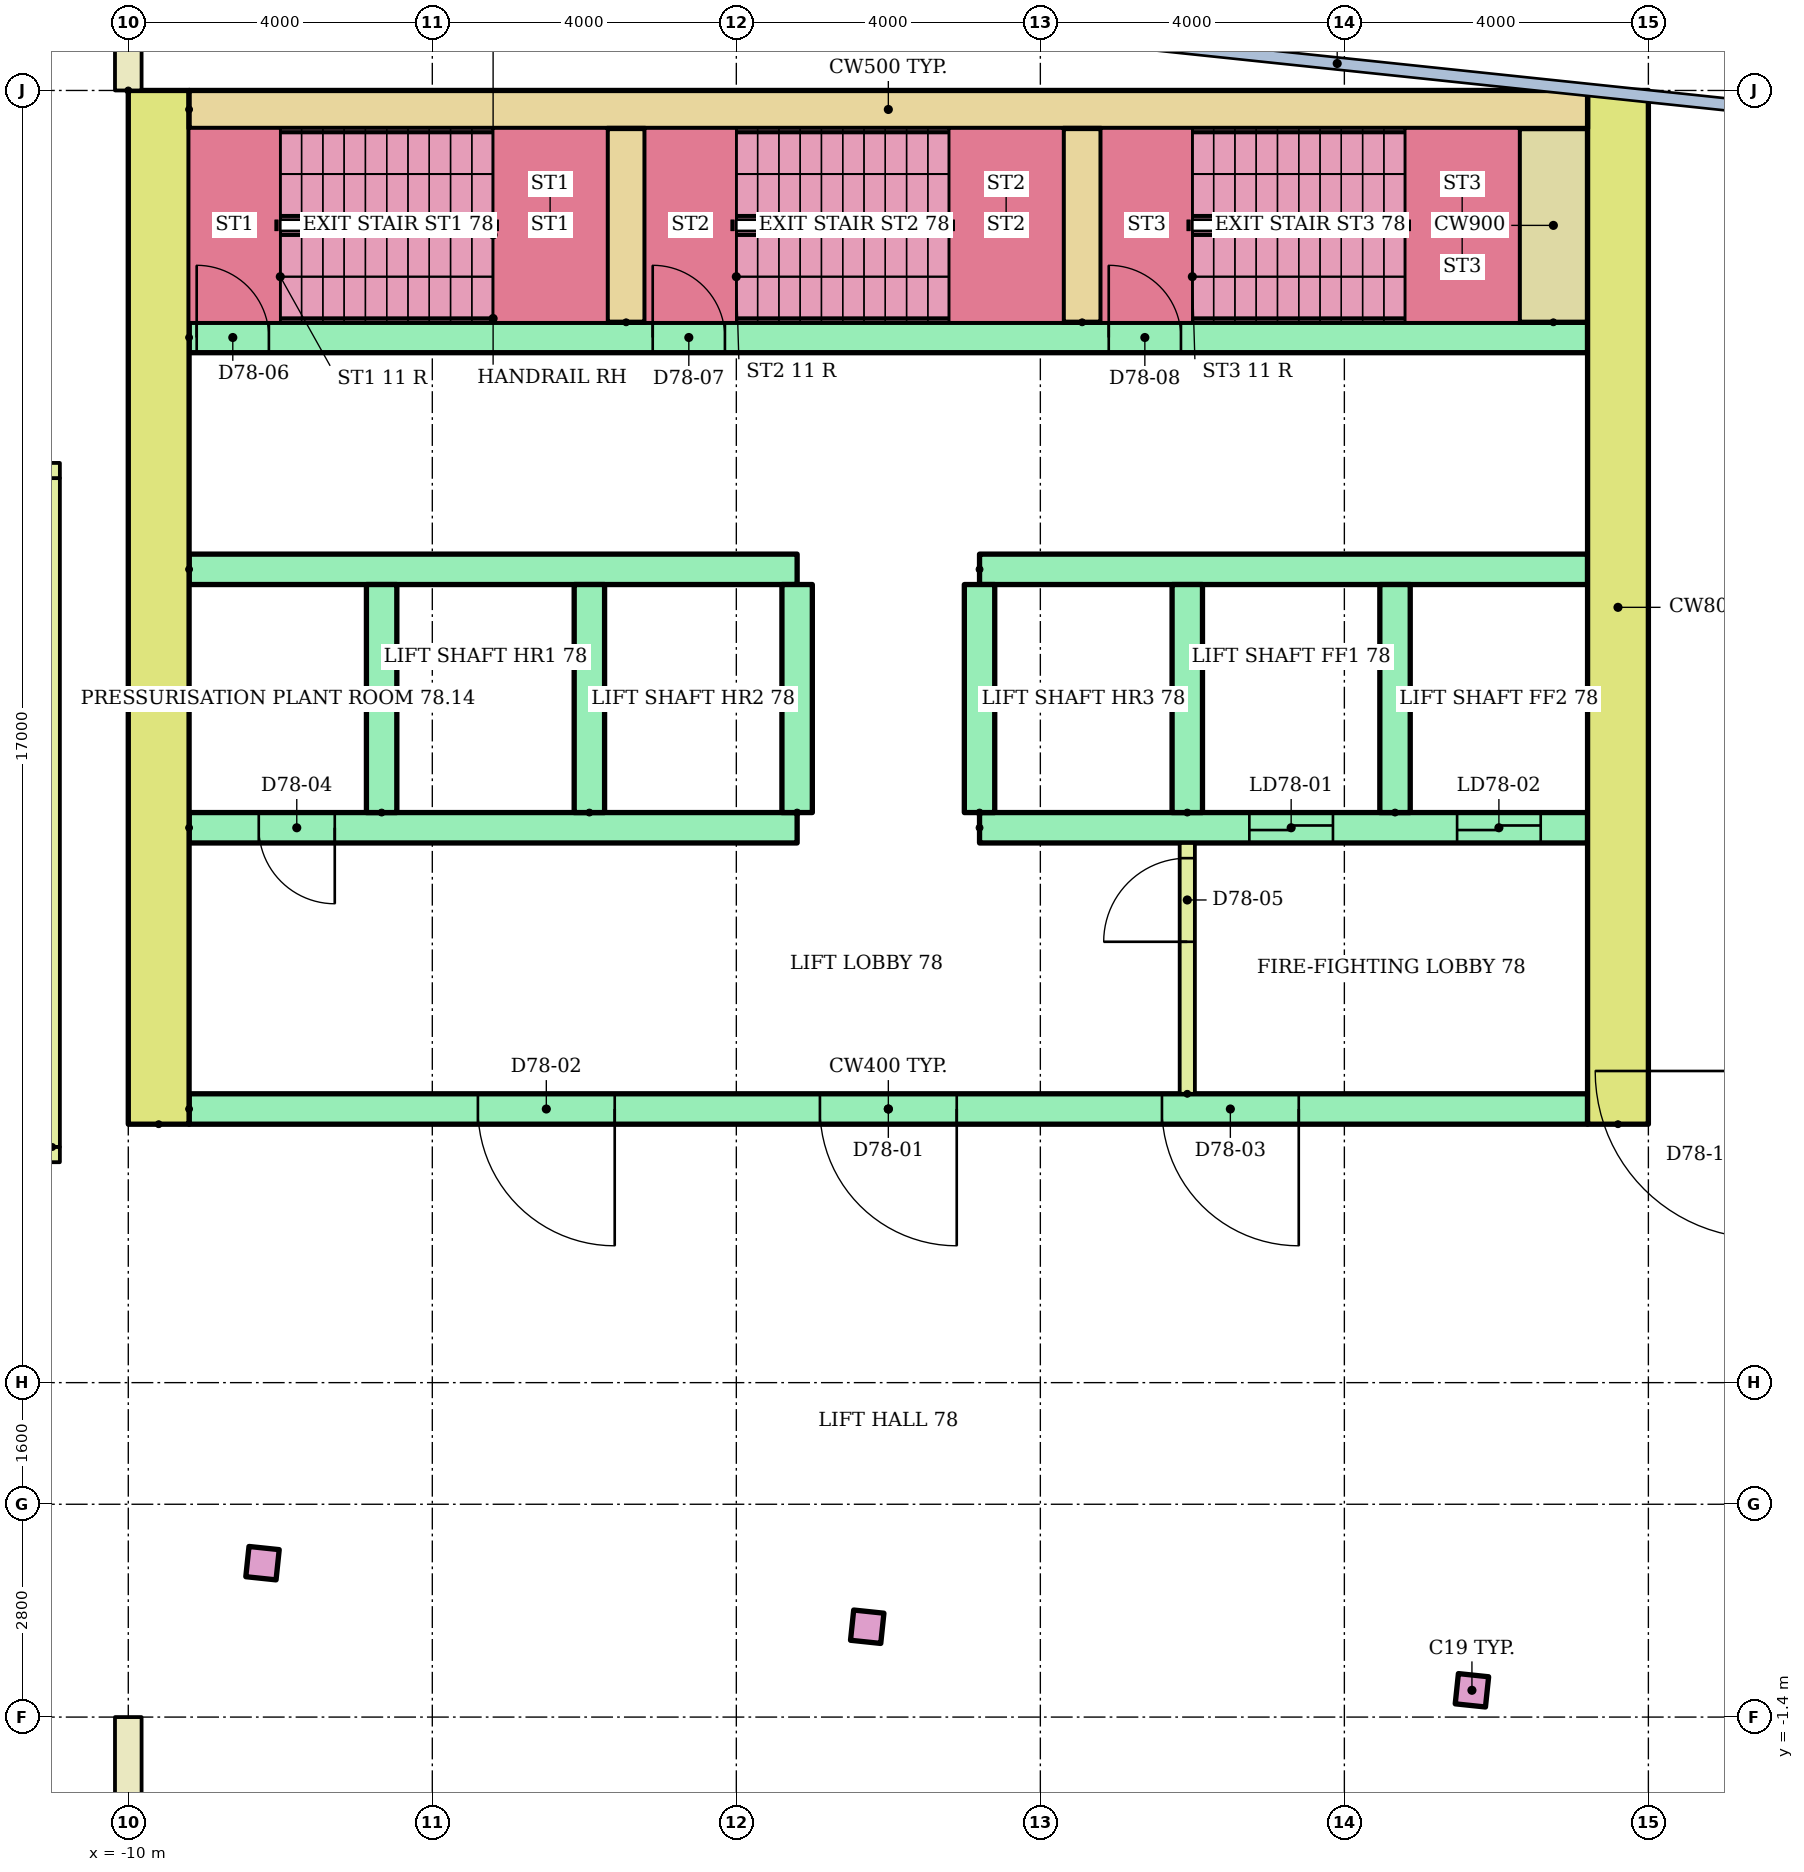
"""IFC4 building model, lengths in metres.
Left out: names, types, materials, properties, quantities, classifications, styles, units other than length and angle.
Written with IfcOpenShell. Run it as: python <this file> out.ifc"""

import sys

from ifc_helpers import new_model, si_unit, direction, frame, frame_2d, origin, origin_2d, place, context, subcontext, project, spatial, rectangle, extrude, element, fill, save


model = new_model("IFC4")
c1 = context("Model", 3, precision=1e-05, world=origin(), true_north=direction((0.0, 1.0)))
c2 = subcontext(c1, "Body", "Model", "MODEL_VIEW")
j1 = project(units=[si_unit("LENGTHUNIT", "METRE"), si_unit("PLANEANGLEUNIT", "RADIAN")], contexts=[c1])
p1 = place(None, origin())
s1 = spatial("IfcSite", under=j1, at=p1, CompositionType="ELEMENT")
p2 = place(p1, origin())
s2 = spatial("IfcBuilding", under=s1, at=p2, CompositionType="ELEMENT")
p3 = place(p2, frame((0.0, 0.0, 301.7)))
s3 = spatial("IfcBuildingStorey", under=s2, at=p3, CompositionType="ELEMENT", Elevation=301.7)
for number, where, z_axis, x_axis in (
    (1, (-8.234, 0.625, 0.0), (0.0, 0.0, 1.0), (0.995, -0.105, 0.0)),
    (2, (-0.278, -0.211, 0.0), (0.0, 0.0, 1.0), (0.995, -0.105, 0.0)),
    (3, (7.678, -1.048, 0.0), (0.0, 0.0, 1.0), (0.995, -0.105, 0.0)),
):
    element("IfcColumn", number, at=place(p3, frame(where, z_axis=z_axis, x_axis=x_axis)), inside=s3, PredefinedType="COLUMN", context=c2, shape_type="SweptSolid", body=[
        extrude(rectangle(XDim=0.4, YDim=0.4, at=origin_2d()), origin(), (0.0, 0.0, 1.0), 7.5),
    ])
for number, where, z_axis, x_axis in (
    (4, (-9.6, 6.4, 0.0), (0.0, 0.0, 1.0), (0.0, 1.0, 0.0)),
    (5, (9.6, 6.4, 0.0), (0.0, 0.0, 1.0), (0.0, 1.0, 0.0)),
):
    element("IfcWall", number, at=place(p3, frame(where, z_axis=z_axis, x_axis=x_axis)), inside=s3, PredefinedType="SHEAR", context=c2, shape_type="SweptSolid", body=[
        extrude(rectangle(XDim=13.6, YDim=0.8, at=frame_2d((6.8, 0.0))), origin(), (0.0, 0.0, 1.0), 7.08),
    ])
p4 = place(p3, frame((-9.2, 19.75, 0.0)))
e6 = element("IfcWall", 6, at=p4, inside=s3, PredefinedType="SHEAR", context=c2, shape_type="SweptSolid", body=[
    extrude(rectangle(XDim=18.4, YDim=0.5, at=frame_2d((9.2, 0.0))), origin(), (0.0, 0.0, 1.0), 7.08),
])
p5 = place(p3, frame((-9.2, 6.6, 0.0)))
e7 = element("IfcWall", 7, at=p5, inside=s3, PredefinedType="SHEAR", context=c2, shape_type="SweptSolid", body=[
    extrude(rectangle(XDim=18.4, YDim=0.4, at=frame_2d((9.2, 0.0))), origin(), (0.0, 0.0, 1.0), 7.08),
])
p6 = place(p5, frame((8.3, 0.0, 0.0)))
e8 = element("IfcOpeningElement", 8, at=p6, cuts=e7, PredefinedType="OPENING", context=c2, shape_type="SweptSolid", body=[
    extrude(rectangle(XDim=1.8, YDim=2.1, at=frame_2d((0.9, 1.05))), frame((0.0, 0.21, 0.0), z_axis=(0.0, -1.0, 0.0), x_axis=(1.0, 0.0, 0.0)), (0.0, 0.0, 1.0), 0.42),
])
p7 = place(p5, frame((3.8, 0.0, 0.0)))
e9 = element("IfcOpeningElement", 9, at=p7, cuts=e7, PredefinedType="OPENING", context=c2, shape_type="SweptSolid", body=[
    extrude(rectangle(XDim=1.8, YDim=2.1, at=frame_2d((0.9, 1.05))), frame((0.0, 0.21, 0.0), z_axis=(0.0, -1.0, 0.0), x_axis=(1.0, 0.0, 0.0)), (0.0, 0.0, 1.0), 0.42),
])
p8 = place(p5, frame((12.8, 0.0, 0.0)))
e10 = element("IfcOpeningElement", 10, at=p8, cuts=e7, PredefinedType="OPENING", context=c2, shape_type="SweptSolid", body=[
    extrude(rectangle(XDim=1.8, YDim=2.1, at=frame_2d((0.9, 1.05))), frame((0.0, 0.21, 0.0), z_axis=(0.0, -1.0, 0.0), x_axis=(1.0, 0.0, 0.0)), (0.0, 0.0, 1.0), 0.42),
])
p9 = place(p3, frame((-9.2, 10.3, 0.0)))
e11 = element("IfcWall", 11, at=p9, inside=s3, PredefinedType="SHEAR", context=c2, shape_type="SweptSolid", body=[
    extrude(rectangle(XDim=8.0, YDim=0.4, at=frame_2d((4.0, 0.0))), origin(), (0.0, 0.0, 1.0), 7.08),
])
p10 = place(p9, frame((0.917, 0.0, 0.0)))
e12 = element("IfcOpeningElement", 12, at=p10, cuts=e11, PredefinedType="OPENING", context=c2, shape_type="SweptSolid", body=[
    extrude(rectangle(XDim=1.0, YDim=2.1, at=frame_2d((0.5, 1.05))), frame((0.0, 0.21, 0.0), z_axis=(0.0, -1.0, 0.0), x_axis=(1.0, 0.0, 0.0)), (0.0, 0.0, 1.0), 0.42),
])
p11 = place(p3, frame((-9.2, 13.7, 0.0)))
e13 = element("IfcWall", 13, at=p11, inside=s3, PredefinedType="SHEAR", context=c2, shape_type="SweptSolid", body=[
    extrude(rectangle(XDim=8.0, YDim=0.4, at=frame_2d((4.0, 0.0))), origin(), (0.0, 0.0, 1.0), 7.08),
])
p12 = place(p3, frame((1.2, 10.3, 0.0)))
e14 = element("IfcWall", 14, at=p12, inside=s3, PredefinedType="SHEAR", context=c2, shape_type="SweptSolid", body=[
    extrude(rectangle(XDim=8.0, YDim=0.4, at=frame_2d((4.0, 0.0))), origin(), (0.0, 0.0, 1.0), 7.08),
])
p13 = place(p12, frame((3.55, 0.0, 0.0)))
e15 = element("IfcOpeningElement", 15, at=p13, cuts=e14, PredefinedType="OPENING", context=c2, shape_type="SweptSolid", body=[
    extrude(rectangle(XDim=1.1, YDim=2.1, at=frame_2d((0.55, 1.05))), frame((0.0, 0.21, 0.0), z_axis=(0.0, -1.0, 0.0), x_axis=(1.0, 0.0, 0.0)), (0.0, 0.0, 1.0), 0.42),
])
p14 = place(p12, frame((6.283, 0.0, 0.0)))
e16 = element("IfcOpeningElement", 16, at=p14, cuts=e14, PredefinedType="OPENING", context=c2, shape_type="SweptSolid", body=[
    extrude(rectangle(XDim=1.1, YDim=2.1, at=frame_2d((0.55, 1.05))), frame((0.0, 0.21, 0.0), z_axis=(0.0, -1.0, 0.0), x_axis=(1.0, 0.0, 0.0)), (0.0, 0.0, 1.0), 0.42),
])
p15 = place(p3, frame((1.2, 13.7, 0.0)))
e17 = element("IfcWall", 17, at=p15, inside=s3, PredefinedType="SHEAR", context=c2, shape_type="SweptSolid", body=[
    extrude(rectangle(XDim=8.0, YDim=0.4, at=frame_2d((4.0, 0.0))), origin(), (0.0, 0.0, 1.0), 7.08),
])
for number, where, z_axis, x_axis in (
    (18, (-6.667, 10.5, 0.0), (0.0, 0.0, 1.0), (0.0, 1.0, 0.0)),
    (19, (-3.933, 10.5, 0.0), (0.0, 0.0, 1.0), (0.0, 1.0, 0.0)),
    (20, (-1.2, 10.5, 0.0), (0.0, 0.0, 1.0), (0.0, 1.0, 0.0)),
    (21, (1.2, 10.5, 0.0), (0.0, 0.0, 1.0), (0.0, 1.0, 0.0)),
    (22, (3.933, 10.5, 0.0), (0.0, 0.0, 1.0), (0.0, 1.0, 0.0)),
    (23, (6.667, 10.5, 0.0), (0.0, 0.0, 1.0), (0.0, 1.0, 0.0)),
):
    element("IfcWall", number, at=place(p3, frame(where, z_axis=z_axis, x_axis=x_axis)), inside=s3, PredefinedType="SHEAR", context=c2, shape_type="SweptSolid", body=[
        extrude(rectangle(XDim=3.0, YDim=0.4, at=frame_2d((1.5, 0.0))), origin(), (0.0, 0.0, 1.0), 7.08),
    ])
p16 = place(p3, frame((3.933, 6.8, 0.0), z_axis=(0.0, 0.0, 1.0), x_axis=(0.0, 1.0, 0.0)))
e24 = element("IfcWall", 24, at=p16, inside=s3, PredefinedType="PARTITIONING", context=c2, shape_type="SweptSolid", body=[
    extrude(rectangle(XDim=3.3, YDim=0.2, at=frame_2d((1.65, 0.0))), origin(), (0.0, 0.0, 1.0), 7.08),
])
p17 = place(p16, frame((2.0, 0.0, 0.0)))
e25 = element("IfcOpeningElement", 25, at=p17, cuts=e24, PredefinedType="OPENING", context=c2, shape_type="SweptSolid", body=[
    extrude(rectangle(XDim=1.1, YDim=2.1, at=frame_2d((0.55, 1.05))), frame((0.0, 0.11, 0.0), z_axis=(0.0, -1.0, 0.0), x_axis=(1.0, 0.0, 0.0)), (0.0, 0.0, 1.0), 0.22),
])
p18 = place(p3, frame((-9.2, 16.75, 0.0)))
e26 = element("IfcWall", 26, at=p18, inside=s3, PredefinedType="SHEAR", context=c2, shape_type="SweptSolid", body=[
    extrude(rectangle(XDim=18.4, YDim=0.4, at=frame_2d((9.2, 0.0))), origin(), (0.0, 0.0, 1.0), 7.08),
])
p19 = place(p18, frame((0.1, 0.0, 0.0)))
e27 = element("IfcOpeningElement", 27, at=p19, cuts=e26, PredefinedType="OPENING", context=c2, shape_type="SweptSolid", body=[
    extrude(rectangle(XDim=0.95, YDim=2.1, at=frame_2d((0.475, 1.05))), frame((0.0, 0.21, 0.0), z_axis=(0.0, -1.0, 0.0), x_axis=(1.0, 0.0, 0.0)), (0.0, 0.0, 1.0), 0.42),
])
p20 = place(p18, frame((6.1, 0.0, 0.0)))
e28 = element("IfcOpeningElement", 28, at=p20, cuts=e26, PredefinedType="OPENING", context=c2, shape_type="SweptSolid", body=[
    extrude(rectangle(XDim=0.95, YDim=2.1, at=frame_2d((0.475, 1.05))), frame((0.0, 0.21, 0.0), z_axis=(0.0, -1.0, 0.0), x_axis=(1.0, 0.0, 0.0)), (0.0, 0.0, 1.0), 0.42),
])
p21 = place(p18, frame((12.1, 0.0, 0.0)))
e29 = element("IfcOpeningElement", 29, at=p21, cuts=e26, PredefinedType="OPENING", context=c2, shape_type="SweptSolid", body=[
    extrude(rectangle(XDim=0.95, YDim=2.1, at=frame_2d((0.475, 1.05))), frame((0.0, 0.21, 0.0), z_axis=(0.0, -1.0, 0.0), x_axis=(1.0, 0.0, 0.0)), (0.0, 0.0, 1.0), 0.42),
])
for number, where, z_axis, x_axis in (
    (30, (-3.45, 16.95, 0.0), (0.0, 0.0, 1.0), (0.0, 1.0, 0.0)),
    (31, (2.55, 16.95, 0.0), (0.0, 0.0, 1.0), (0.0, 1.0, 0.0)),
):
    element("IfcWall", number, at=place(p3, frame(where, z_axis=z_axis, x_axis=x_axis)), inside=s3, PredefinedType="SHEAR", context=c2, shape_type="SweptSolid", body=[
        extrude(rectangle(XDim=2.55, YDim=0.5, at=frame_2d((1.275, 0.0))), origin(), (0.0, 0.0, 1.0), 7.08),
    ])
p22 = place(p3, frame((8.75, 16.95, 0.0), z_axis=(0.0, 0.0, 1.0), x_axis=(0.0, 1.0, 0.0)))
e32 = element("IfcWall", 32, at=p22, inside=s3, PredefinedType="SHEAR", context=c2, shape_type="SweptSolid", body=[
    extrude(rectangle(XDim=2.55, YDim=0.9, at=frame_2d((1.275, 0.0))), origin(), (0.0, 0.0, 1.0), 7.08),
])
p23 = place(p3, frame((-11.0, 6.1, 0.0), z_axis=(0.0, 0.0, 1.0), x_axis=(0.0, 1.0, 0.0)))
e33 = element("IfcWall", 33, at=p23, inside=s3, PredefinedType="PARTITIONING", context=c2, shape_type="SweptSolid", body=[
    extrude(rectangle(XDim=8.8, YDim=0.2, at=frame_2d((4.4, 0.0))), origin(), (0.0, 0.0, 1.0), 7.08),
])
p24 = place(p3, frame((-18.9, 6.0, 0.0)))
e34 = element("IfcWall", 34, at=p24, inside=s3, PredefinedType="PARTITIONING", context=c2, shape_type="SweptSolid", body=[
    extrude(rectangle(XDim=8.0, YDim=0.2, at=frame_2d((4.0, 0.0))), origin(), (0.0, 0.0, 1.0), 7.08),
])
p25 = place(p24, frame((3.4, 0.0, 0.0)))
e35 = element("IfcOpeningElement", 35, at=p25, cuts=e34, PredefinedType="OPENING", context=c2, shape_type="SweptSolid", body=[
    extrude(rectangle(XDim=1.0, YDim=2.1, at=frame_2d((0.5, 1.05))), frame((0.0, 0.11, 0.0), z_axis=(0.0, -1.0, 0.0), x_axis=(1.0, 0.0, 0.0)), (0.0, 0.0, 1.0), 0.22),
])
p26 = place(p3, frame((-19.1, 15.0, 0.0)))
e36 = element("IfcWall", 36, at=p26, inside=s3, PredefinedType="PARTITIONING", context=c2, shape_type="SweptSolid", body=[
    extrude(rectangle(XDim=8.2, YDim=0.2, at=frame_2d((4.1, 0.0))), origin(), (0.0, 0.0, 1.0), 7.08),
])
p27 = place(p3, frame((-10.0, -14.071, 0.0), z_axis=(0.0, 0.0, 1.0), x_axis=(0.0, 1.0, 0.0)))
e37 = element("IfcWall", 37, at=p27, inside=s3, PredefinedType="PARTITIONING", context=c2, shape_type="SweptSolid", body=[
    extrude(rectangle(XDim=12.671, YDim=0.35, at=frame_2d((6.335, 0.0))), origin(), (0.0, 0.0, 1.0), 7.08),
])
p28 = place(p27, frame((4.436, 0.0, 0.0)))
e38 = element("IfcOpeningElement", 38, at=p28, cuts=e37, PredefinedType="OPENING", context=c2, shape_type="SweptSolid", body=[
    extrude(rectangle(XDim=1.8, YDim=2.1, at=frame_2d((0.9, 1.05))), frame((0.0, 0.185, 0.0), z_axis=(0.0, -1.0, 0.0), x_axis=(1.0, 0.0, 0.0)), (0.0, 0.0, 1.0), 0.37),
])
p29 = place(p3, frame((-10.0, 20.0, 0.0), z_axis=(0.0, 0.0, 1.0), x_axis=(0.0, 1.0, 0.0)))
e39 = element("IfcWall", 39, at=p29, inside=s3, PredefinedType="PARTITIONING", context=c2, shape_type="SweptSolid", body=[
    extrude(rectangle(XDim=2.127, YDim=0.35, at=frame_2d((1.063, 0.0))), origin(), (0.0, 0.0, 1.0), 7.08),
])
p30 = place(p6, frame((1.8, 0.0, 0.0), z_axis=(0.0, 0.0, 1.0), x_axis=(-1.0, 0.0, 0.0)))
e40 = element("IfcDoor", 40, at=p30, inside=s3, OperationType="DOUBLE_DOOR_SINGLE_SWING", PredefinedType="DOOR", context=c2, shape_type="SweptSolid", body=[
    extrude(rectangle(XDim=1.8, YDim=2.1, at=frame_2d((0.9, 1.05))), frame((0.0, 0.025, 0.0), z_axis=(0.0, -1.0, 0.0), x_axis=(1.0, 0.0, 0.0)), (0.0, 0.0, 1.0), 0.05),
])
fill(e8, e40)
p31 = place(p7, frame((1.8, 0.0, 0.0), z_axis=(0.0, 0.0, 1.0), x_axis=(-1.0, 0.0, 0.0)))
e41 = element("IfcDoor", 41, at=p31, inside=s3, OperationType="DOUBLE_DOOR_SINGLE_SWING", PredefinedType="DOOR", context=c2, shape_type="SweptSolid", body=[
    extrude(rectangle(XDim=1.8, YDim=2.1, at=frame_2d((0.9, 1.05))), frame((0.0, 0.025, 0.0), z_axis=(0.0, -1.0, 0.0), x_axis=(1.0, 0.0, 0.0)), (0.0, 0.0, 1.0), 0.05),
])
fill(e9, e41)
p32 = place(p8, frame((1.8, 0.0, 0.0), z_axis=(0.0, 0.0, 1.0), x_axis=(-1.0, 0.0, 0.0)))
e42 = element("IfcDoor", 42, at=p32, inside=s3, OperationType="DOUBLE_DOOR_SINGLE_SWING", PredefinedType="DOOR", context=c2, shape_type="SweptSolid", body=[
    extrude(rectangle(XDim=1.8, YDim=2.1, at=frame_2d((0.9, 1.05))), frame((0.0, 0.025, 0.0), z_axis=(0.0, -1.0, 0.0), x_axis=(1.0, 0.0, 0.0)), (0.0, 0.0, 1.0), 0.05),
])
fill(e10, e42)
p33 = place(p13, origin())
e43 = element("IfcDoor", 43, at=p33, inside=s3, OperationType="SLIDING_TO_LEFT", PredefinedType="DOOR", context=c2, shape_type="SweptSolid", body=[
    extrude(rectangle(XDim=1.1, YDim=2.1, at=frame_2d((0.55, 1.05))), frame((0.0, 0.025, 0.0), z_axis=(0.0, -1.0, 0.0), x_axis=(1.0, 0.0, 0.0)), (0.0, 0.0, 1.0), 0.05),
])
fill(e15, e43)
p34 = place(p14, origin())
e44 = element("IfcDoor", 44, at=p34, inside=s3, OperationType="SLIDING_TO_LEFT", PredefinedType="DOOR", context=c2, shape_type="SweptSolid", body=[
    extrude(rectangle(XDim=1.1, YDim=2.1, at=frame_2d((0.55, 1.05))), frame((0.0, 0.025, 0.0), z_axis=(0.0, -1.0, 0.0), x_axis=(1.0, 0.0, 0.0)), (0.0, 0.0, 1.0), 0.05),
])
fill(e16, e44)
p35 = place(p10, frame((1.0, 0.0, 0.0), z_axis=(0.0, 0.0, 1.0), x_axis=(-1.0, 0.0, 0.0)))
e45 = element("IfcDoor", 45, at=p35, inside=s3, OperationType="SINGLE_SWING_RIGHT", PredefinedType="DOOR", context=c2, shape_type="SweptSolid", body=[
    extrude(rectangle(XDim=1.0, YDim=2.1, at=frame_2d((0.5, 1.05))), frame((0.0, 0.025, 0.0), z_axis=(0.0, -1.0, 0.0), x_axis=(1.0, 0.0, 0.0)), (0.0, 0.0, 1.0), 0.05),
])
fill(e12, e45)
p36 = place(p17, origin())
e46 = element("IfcDoor", 46, at=p36, inside=s3, OperationType="SINGLE_SWING_LEFT", PredefinedType="DOOR", context=c2, shape_type="SweptSolid", body=[
    extrude(rectangle(XDim=1.1, YDim=2.1, at=frame_2d((0.55, 1.05))), frame((0.0, 0.025, 0.0), z_axis=(0.0, -1.0, 0.0), x_axis=(1.0, 0.0, 0.0)), (0.0, 0.0, 1.0), 0.05),
])
fill(e25, e46)
p37 = place(p19, origin())
e47 = element("IfcDoor", 47, at=p37, inside=s3, OperationType="SINGLE_SWING_LEFT", PredefinedType="DOOR", context=c2, shape_type="SweptSolid", body=[
    extrude(rectangle(XDim=0.95, YDim=2.1, at=frame_2d((0.475, 1.05))), frame((0.0, 0.025, 0.0), z_axis=(0.0, -1.0, 0.0), x_axis=(1.0, 0.0, 0.0)), (0.0, 0.0, 1.0), 0.05),
])
fill(e27, e47)
p38 = place(p20, origin())
e48 = element("IfcDoor", 48, at=p38, inside=s3, OperationType="SINGLE_SWING_LEFT", PredefinedType="DOOR", context=c2, shape_type="SweptSolid", body=[
    extrude(rectangle(XDim=0.95, YDim=2.1, at=frame_2d((0.475, 1.05))), frame((0.0, 0.025, 0.0), z_axis=(0.0, -1.0, 0.0), x_axis=(1.0, 0.0, 0.0)), (0.0, 0.0, 1.0), 0.05),
])
fill(e28, e48)
p39 = place(p21, origin())
e49 = element("IfcDoor", 49, at=p39, inside=s3, OperationType="SINGLE_SWING_LEFT", PredefinedType="DOOR", context=c2, shape_type="SweptSolid", body=[
    extrude(rectangle(XDim=0.95, YDim=2.1, at=frame_2d((0.475, 1.05))), frame((0.0, 0.025, 0.0), z_axis=(0.0, -1.0, 0.0), x_axis=(1.0, 0.0, 0.0)), (0.0, 0.0, 1.0), 0.05),
])
fill(e29, e49)
save(model, sys.argv[1])
